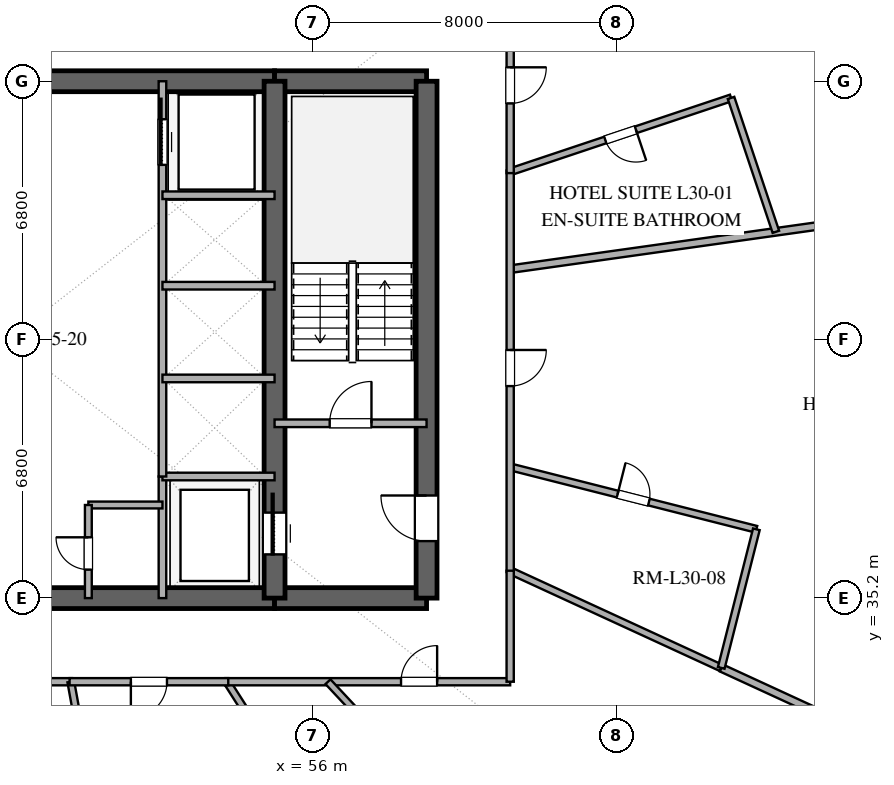
"""IFC4 building model, lengths in metres.
Left out: names, types, materials, properties, quantities, classifications, styles, units other than length and angle.
Written with IfcOpenShell. Run it as: python <this file> out.ifc"""

import sys

from ifc_helpers import new_model, si_unit, direction, frame, frame_2d, origin, place, context, subcontext, project, spatial, rectangle, extrude, element, fill, save


model = new_model("IFC4")
c1 = context("Model", 3, precision=1e-05, world=origin(), true_north=direction((0.0, 1.0)))
c2 = subcontext(c1, "Body", "Model", "MODEL_VIEW")
j1 = project(units=[si_unit("LENGTHUNIT", "METRE"), si_unit("PLANEANGLEUNIT", "RADIAN")], contexts=[c1])
p1 = place(None, origin())
s1 = spatial("IfcSite", under=j1, at=p1, CompositionType="ELEMENT")
p2 = place(p1, origin())
s2 = spatial("IfcBuilding", under=s1, at=p2, CompositionType="ELEMENT")
p3 = place(p2, frame((0.0, 0.0, 120.0)))
s3 = spatial("IfcBuildingStorey", under=s2, at=p3, CompositionType="ELEMENT", Elevation=120.0)
p4 = place(p3, frame((41.0, 35.2, 0.0), z_axis=(0.0, 0.0, 1.0), x_axis=(1.0, 0.0, 0.0)))
e1 = element("IfcWall", 1, at=p4, inside=s3, PredefinedType="SHEAR", context=c2, shape_type="SweptSolid", body=[
    extrude(rectangle(XDim=14.0, YDim=0.55, at=frame_2d((7.0, 0.0))), origin(), (0.0, 0.0, 1.0), 3.38),
])
p5 = place(p4, frame((6.1, 0.0, 0.0)))
e2 = element("IfcOpeningElement", 2, at=p5, cuts=e1, PredefinedType="OPENING", context=c2, shape_type="SweptSolid", body=[
    extrude(rectangle(XDim=1.8, YDim=2.25, at=frame_2d((0.9, 1.125))), frame((0.0, 0.285, 0.0), z_axis=(0.0, -1.0, 0.0), x_axis=(1.0, 0.0, 0.0)), (0.0, 0.0, 1.0), 0.57),
])
p6 = place(p3, frame((55.0, 35.2, 0.0), z_axis=(0.0, 0.0, 1.0), x_axis=(1.0, 0.0, 0.0)))
e3 = element("IfcWall", 3, at=p6, inside=s3, PredefinedType="SHEAR", context=c2, shape_type="SweptSolid", body=[
    extrude(rectangle(XDim=4.0, YDim=0.55, at=frame_2d((2.0, 0.0))), origin(), (0.0, 0.0, 1.0), 3.38),
])
p7 = place(p3, frame((41.0, 48.8, 0.0), z_axis=(0.0, 0.0, 1.0), x_axis=(1.0, 0.0, 0.0)))
e4 = element("IfcWall", 4, at=p7, inside=s3, PredefinedType="SHEAR", context=c2, shape_type="SweptSolid", body=[
    extrude(rectangle(XDim=14.0, YDim=0.55, at=frame_2d((7.0, 0.0))), origin(), (0.0, 0.0, 1.0), 3.38),
])
p8 = place(p7, frame((6.1, 0.0, 0.0)))
e5 = element("IfcOpeningElement", 5, at=p8, cuts=e4, PredefinedType="OPENING", context=c2, shape_type="SweptSolid", body=[
    extrude(rectangle(XDim=1.8, YDim=2.25, at=frame_2d((0.9, 1.125))), frame((0.0, 0.285, 0.0), z_axis=(0.0, -1.0, 0.0), x_axis=(1.0, 0.0, 0.0)), (0.0, 0.0, 1.0), 0.57),
])
p9 = place(p3, frame((55.0, 48.8, 0.0), z_axis=(0.0, 0.0, 1.0), x_axis=(1.0, 0.0, 0.0)))
e6 = element("IfcWall", 6, at=p9, inside=s3, PredefinedType="SHEAR", context=c2, shape_type="SweptSolid", body=[
    extrude(rectangle(XDim=4.0, YDim=0.55, at=frame_2d((2.0, 0.0))), origin(), (0.0, 0.0, 1.0), 3.38),
])
p10 = place(p3, frame((59.0, 35.2, 0.0), z_axis=(0.0, 0.0, 1.0), x_axis=(0.0, 1.0, 0.0)))
e7 = element("IfcWall", 7, at=p10, inside=s3, PredefinedType="SHEAR", context=c2, shape_type="SweptSolid", body=[
    extrude(rectangle(XDim=13.6, YDim=0.55, at=frame_2d((6.8, 0.0))), origin(), (0.0, 0.0, 1.0), 3.38),
])
p11 = place(p10, frame((1.5, 0.0, 0.0)))
e8 = element("IfcOpeningElement", 8, at=p11, cuts=e7, PredefinedType="OPENING", context=c2, shape_type="SweptSolid", body=[
    extrude(rectangle(XDim=1.2, YDim=2.15, at=frame_2d((0.6, 1.075))), frame((0.0, 0.285, 0.0), z_axis=(0.0, -1.0, 0.0), x_axis=(1.0, 0.0, 0.0)), (0.0, 0.0, 1.0), 0.57),
])
p12 = place(p3, frame((55.0, 35.2, 0.0), z_axis=(0.0, 0.0, 1.0), x_axis=(0.0, 1.0, 0.0)))
e9 = element("IfcWall", 9, at=p12, inside=s3, PredefinedType="SHEAR", context=c2, shape_type="SweptSolid", body=[
    extrude(rectangle(XDim=13.6, YDim=0.55, at=frame_2d((6.8, 0.0))), origin(), (0.0, 0.0, 1.0), 3.38),
])
p13 = place(p12, frame((1.15, 0.0, 0.0)))
e10 = element("IfcOpeningElement", 10, at=p13, cuts=e9, PredefinedType="OPENING", context=c2, shape_type="SweptSolid", body=[
    extrude(rectangle(XDim=1.1, YDim=2.2, at=frame_2d((0.55, 1.1))), frame((0.0, 0.285, 0.0), z_axis=(0.0, -1.0, 0.0), x_axis=(1.0, 0.0, 0.0)), (0.0, 0.0, 1.0), 0.57),
])
p14 = place(p3, frame((68.84, 26.14, 0.0), z_axis=(0.0, 0.0, 1.0), x_axis=(0.637505817448, 0.770445541696, 0.0)))
e11 = element("IfcWall", 11, at=p14, inside=s3, PredefinedType="SOLIDWALL", context=c2, shape_type="SweptSolid", body=[
    extrude(rectangle(XDim=9.445, YDim=0.28, at=frame_2d((4.723, 0.0))), origin(), (0.0, 0.0, 1.0), 3.38),
])
p15 = place(p14, frame((1.963, 0.0, 0.85)))
e12 = element("IfcOpeningElement", 12, at=p15, cuts=e11, PredefinedType="OPENING", context=c2, shape_type="SweptSolid", body=[
    extrude(rectangle(XDim=1.35, YDim=1.8, at=frame_2d((0.675, 0.9))), frame((0.0, 0.15, 0.0), z_axis=(0.0, -1.0, 0.0), x_axis=(1.0, 0.0, 0.0)), (0.0, 0.0, 1.0), 0.3),
])
p16 = place(p14, frame((3.815, 0.0, 0.85)))
e13 = element("IfcOpeningElement", 13, at=p16, cuts=e11, PredefinedType="OPENING", context=c2, shape_type="SweptSolid", body=[
    extrude(rectangle(XDim=1.35, YDim=1.8, at=frame_2d((0.675, 0.9))), frame((0.0, 0.15, 0.0), z_axis=(0.0, -1.0, 0.0), x_axis=(1.0, 0.0, 0.0)), (0.0, 0.0, 1.0), 0.3),
])
p17 = place(p14, frame((6.417, 0.0, 0.85)))
e14 = element("IfcOpeningElement", 14, at=p17, cuts=e11, PredefinedType="OPENING", context=c2, shape_type="SweptSolid", body=[
    extrude(rectangle(XDim=1.2, YDim=1.8, at=frame_2d((0.6, 0.9))), frame((0.0, 0.15, 0.0), z_axis=(0.0, -1.0, 0.0), x_axis=(1.0, 0.0, 0.0)), (0.0, 0.0, 1.0), 0.3),
])
p18 = place(p3, frame((55.0, 39.8, 0.0), z_axis=(0.0, 0.0, 1.0), x_axis=(1.0, 0.0, 0.0)))
e15 = element("IfcWall", 15, at=p18, inside=s3, PredefinedType="SOLIDWALL", context=c2, shape_type="SweptSolid", body=[
    extrude(rectangle(XDim=4.0, YDim=0.2, at=frame_2d((2.0, 0.0))), origin(), (0.0, 0.0, 1.0), 2.74),
])
p19 = place(p18, frame((1.45, 0.0, 0.0)))
e16 = element("IfcOpeningElement", 16, at=p19, cuts=e15, PredefinedType="OPENING", context=c2, shape_type="SweptSolid", body=[
    extrude(rectangle(XDim=1.1, YDim=2.15, at=frame_2d((0.55, 1.075))), frame((0.0, 0.11, 0.0), z_axis=(0.0, -1.0, 0.0), x_axis=(1.0, 0.0, 0.0)), (0.0, 0.0, 1.0), 0.22),
])
p20 = place(p3, frame((52.05, 35.2, 0.0), z_axis=(0.0, 0.0, 1.0), x_axis=(0.0, 1.0, 0.0)))
e17 = element("IfcWall", 17, at=p20, inside=s3, PredefinedType="SOLIDWALL", context=c2, shape_type="SweptSolid", body=[
    extrude(rectangle(XDim=3.2, YDim=0.2, at=frame_2d((1.6, 0.0))), origin(), (0.0, 0.0, 1.0), 2.74),
])
p21 = place(p3, frame((52.05, 38.4, 0.0), z_axis=(0.0, 0.0, 1.0), x_axis=(1.0, 0.0, 0.0)))
e18 = element("IfcWall", 18, at=p21, inside=s3, PredefinedType="SOLIDWALL", context=c2, shape_type="SweptSolid", body=[
    extrude(rectangle(XDim=2.95, YDim=0.2, at=frame_2d((1.475, 0.0))), origin(), (0.0, 0.0, 1.0), 2.74),
])
p22 = place(p3, frame((52.05, 38.4, 0.0), z_axis=(0.0, 0.0, 1.0), x_axis=(0.0, 1.0, 0.0)))
e19 = element("IfcWall", 19, at=p22, inside=s3, PredefinedType="SOLIDWALL", context=c2, shape_type="SweptSolid", body=[
    extrude(rectangle(XDim=10.4, YDim=0.2, at=frame_2d((5.2, 0.0))), origin(), (0.0, 0.0, 1.0), 2.74),
])
p23 = place(p22, frame((8.2, 0.0, 0.0)))
e20 = element("IfcOpeningElement", 20, at=p23, cuts=e19, PredefinedType="OPENING", context=c2, shape_type="SweptSolid", body=[
    extrude(rectangle(XDim=1.2, YDim=2.2, at=frame_2d((0.6, 1.1))), frame((0.0, 0.11, 0.0), z_axis=(0.0, -1.0, 0.0), x_axis=(1.0, 0.0, 0.0)), (0.0, 0.0, 1.0), 0.22),
])
for number, where, z_axis, x_axis in (
    (21, (52.05, 40.98, 0.0), (0.0, 0.0, 1.0), (1.0, 0.0, 0.0)),
    (22, (52.05, 43.42, 0.0), (0.0, 0.0, 1.0), (1.0, 0.0, 0.0)),
    (23, (52.05, 45.8, 0.0), (0.0, 0.0, 1.0), (1.0, 0.0, 0.0)),
):
    element("IfcWall", number, at=place(p3, frame(where, z_axis=z_axis, x_axis=x_axis)), inside=s3, PredefinedType="SOLIDWALL", context=c2, shape_type="SweptSolid", body=[
        extrude(rectangle(XDim=2.95, YDim=0.2, at=frame_2d((1.475, 0.0))), origin(), (0.0, 0.0, 1.0), 2.74),
    ])
p24 = place(p3, frame((50.1, 37.65, 0.0), z_axis=(0.0, 0.0, 1.0), x_axis=(1.0, 0.0, 0.0)))
e24 = element("IfcWall", 24, at=p24, inside=s3, PredefinedType="PLUMBINGWALL", context=c2, shape_type="SweptSolid", body=[
    extrude(rectangle(XDim=1.95, YDim=0.18, at=frame_2d((0.975, 0.0))), origin(), (0.0, 0.0, 1.0), 2.74),
])
p25 = place(p3, frame((50.1, 35.2, 0.0), z_axis=(0.0, 0.0, 1.0), x_axis=(0.0, 1.0, 0.0)))
e25 = element("IfcWall", 25, at=p25, inside=s3, PredefinedType="PLUMBINGWALL", context=c2, shape_type="SweptSolid", body=[
    extrude(rectangle(XDim=2.45, YDim=0.18, at=frame_2d((1.225, 0.0))), origin(), (0.0, 0.0, 1.0), 2.74),
])
p26 = place(p25, frame((0.75, 0.0, 0.0)))
e26 = element("IfcOpeningElement", 26, at=p26, cuts=e25, PredefinedType="OPENING", context=c2, shape_type="SweptSolid", body=[
    extrude(rectangle(XDim=0.85, YDim=2.1, at=frame_2d((0.425, 1.05))), frame((0.0, 0.1, 0.0), z_axis=(0.0, -1.0, 0.0), x_axis=(1.0, 0.0, 0.0)), (0.0, 0.0, 1.0), 0.2),
])
p27 = place(p3, frame((61.2, 43.855, 0.0), z_axis=(0.0, 0.0, 1.0), x_axis=(0.990266848234, 0.139181785048, 0.0)))
e27 = element("IfcWall", 27, at=p27, inside=s3, PredefinedType="PARTITIONING", context=c2, shape_type="SweptSolid", body=[
    extrude(rectangle(XDim=15.005, YDim=0.2, at=frame_2d((7.502, 0.0))), origin(), (0.0, 0.0, 1.0), 2.74),
])
p28 = place(p3, frame((49.671, 33.0, 0.0), z_axis=(0.0, 0.0, 1.0), x_axis=(-1.0, 0.0, 0.0)))
e28 = element("IfcWall", 28, at=p28, inside=s3, PredefinedType="PARTITIONING", context=c2, shape_type="SweptSolid", body=[
    extrude(rectangle(XDim=14.871, YDim=0.19, at=frame_2d((7.436, 0.0))), origin(), (0.0, 0.0, 1.0), 2.74),
])
p29 = place(p28, frame((10.576, 0.0, 0.0)))
e29 = element("IfcOpeningElement", 29, at=p29, cuts=e28, PredefinedType="OPENING", context=c2, shape_type="SweptSolid", body=[
    extrude(rectangle(XDim=0.95, YDim=2.15, at=frame_2d((0.475, 1.075))), frame((0.0, 0.105, 0.0), z_axis=(0.0, -1.0, 0.0), x_axis=(1.0, 0.0, 0.0)), (0.0, 0.0, 1.0), 0.21),
])
p30 = place(p28, frame((4.101, 0.0, 0.0)))
e30 = element("IfcOpeningElement", 30, at=p30, cuts=e28, PredefinedType="OPENING", context=c2, shape_type="SweptSolid", body=[
    extrude(rectangle(XDim=1.0, YDim=2.2, at=frame_2d((0.5, 1.1))), frame((0.0, 0.105, 0.0), z_axis=(0.0, -1.0, 0.0), x_axis=(1.0, 0.0, 0.0)), (0.0, 0.0, 1.0), 0.21),
])
p31 = place(p3, frame((61.2, 38.653, 0.0), z_axis=(0.0, 0.0, 1.0), x_axis=(0.96932048276, -0.24580032893, 0.0)))
e31 = element("IfcWall", 31, at=p31, inside=s3, PredefinedType="PLUMBINGWALL", context=c2, shape_type="SweptSolid", body=[
    extrude(rectangle(XDim=6.684, YDim=0.18, at=frame_2d((3.342, 0.0))), origin(), (0.0, 0.0, 1.0), 2.74),
])
p32 = place(p31, frame((2.917, 0.0, 0.0)))
e32 = element("IfcOpeningElement", 32, at=p32, cuts=e31, PredefinedType="OPENING", context=c2, shape_type="SweptSolid", body=[
    extrude(rectangle(XDim=0.85, YDim=2.1, at=frame_2d((0.425, 1.05))), frame((0.0, 0.1, 0.0), z_axis=(0.0, -1.0, 0.0), x_axis=(1.0, 0.0, 0.0)), (0.0, 0.0, 1.0), 0.2),
])
p33 = place(p3, frame((57.283, 27.454, 0.0), z_axis=(0.0, 0.0, 1.0), x_axis=(-0.537984400251, 0.842954794213, 0.0)))
e33 = element("IfcWall", 33, at=p33, inside=s3, PredefinedType="PLUMBINGWALL", context=c2, shape_type="SweptSolid", body=[
    extrude(rectangle(XDim=6.579, YDim=0.18, at=frame_2d((3.29, 0.0))), origin(), (0.0, 0.0, 1.0), 2.74),
])
p34 = place(p3, frame((72.701, 30.624, 0.0), z_axis=(0.0, 0.0, 1.0), x_axis=(-0.9083071886, 0.418303778536, 0.0)))
e34 = element("IfcWall", 34, at=p34, inside=s3, PredefinedType="PARTITIONING", context=c2, shape_type="SweptSolid", body=[
    extrude(rectangle(XDim=6.548, YDim=0.2, at=frame_2d((3.274, 0.0))), origin(), (0.0, 0.0, 1.0), 2.74),
])
p35 = place(p3, frame((67.012, 48.361, 0.0), z_axis=(0.0, 0.0, 1.0), x_axis=(-0.948332174456, -0.317279193915, 0.0)))
e35 = element("IfcWall", 35, at=p35, inside=s3, PredefinedType="PLUMBINGWALL", context=c2, shape_type="SweptSolid", body=[
    extrude(rectangle(XDim=6.129, YDim=0.18, at=frame_2d((3.064, 0.0))), origin(), (0.0, 0.0, 1.0), 2.74),
])
p36 = place(p35, frame((2.639, 0.0, 0.0)))
e36 = element("IfcOpeningElement", 36, at=p36, cuts=e35, PredefinedType="OPENING", context=c2, shape_type="SweptSolid", body=[
    extrude(rectangle(XDim=0.85, YDim=2.1, at=frame_2d((0.425, 1.05))), frame((0.0, 0.1, 0.0), z_axis=(0.0, -1.0, 0.0), x_axis=(1.0, 0.0, 0.0)), (0.0, 0.0, 1.0), 0.2),
])
p37 = place(p3, frame((66.754, 33.363, 0.0), z_axis=(0.0, 0.0, 1.0), x_axis=(-0.908301480607, 0.418316172681, 0.0)))
e37 = element("IfcWall", 37, at=p37, inside=s3, PredefinedType="PLUMBINGWALL", context=c2, shape_type="SweptSolid", body=[
    extrude(rectangle(XDim=6.115, YDim=0.18, at=frame_2d((3.057, 0.0))), origin(), (0.0, 0.0, 1.0), 2.74),
])
p38 = place(p3, frame((49.638, 33.0, 0.0), z_axis=(0.0, 0.0, 1.0), x_axis=(0.179135653645, -0.983824383512, 0.0)))
e38 = element("IfcWall", 38, at=p38, inside=s3, PredefinedType="PLUMBINGWALL", context=c2, shape_type="SweptSolid", body=[
    extrude(rectangle(XDim=5.839, YDim=0.18, at=frame_2d((2.919, 0.0))), origin(), (0.0, 0.0, 1.0), 2.74),
])
p39 = place(p38, frame((2.494, 0.0, 0.0)))
e39 = element("IfcOpeningElement", 39, at=p39, cuts=e38, PredefinedType="OPENING", context=c2, shape_type="SweptSolid", body=[
    extrude(rectangle(XDim=0.85, YDim=2.1, at=frame_2d((0.425, 1.05))), frame((0.0, 0.1, 0.0), z_axis=(0.0, -1.0, 0.0), x_axis=(1.0, 0.0, 0.0)), (0.0, 0.0, 1.0), 0.2),
])
p40 = place(p3, frame((61.2, 46.45, 0.0), z_axis=(0.0, 0.0, 1.0), x_axis=(0.0, -1.0, 0.0)))
e40 = element("IfcWall", 40, at=p40, inside=s3, PredefinedType="PARTITIONING", context=c2, shape_type="SweptSolid", body=[
    extrude(rectangle(XDim=10.564, YDim=0.19, at=frame_2d((5.282, 0.0))), origin(), (0.0, 0.0, 1.0), 2.74),
])
p41 = place(p40, frame((4.722, 0.0, 0.0)))
e41 = element("IfcOpeningElement", 41, at=p41, cuts=e40, PredefinedType="OPENING", context=c2, shape_type="SweptSolid", body=[
    extrude(rectangle(XDim=0.95, YDim=2.15, at=frame_2d((0.475, 1.075))), frame((0.0, 0.105, 0.0), z_axis=(0.0, -1.0, 0.0), x_axis=(1.0, 0.0, 0.0)), (0.0, 0.0, 1.0), 0.21),
])
p42 = place(p3, frame((53.706, 33.0, 0.0), z_axis=(0.0, 0.0, 1.0), x_axis=(1.0, 0.0, 0.0)))
e42 = element("IfcWall", 42, at=p42, inside=s3, PredefinedType="PARTITIONING", context=c2, shape_type="SweptSolid", body=[
    extrude(rectangle(XDim=7.494, YDim=0.19, at=frame_2d((3.747, 0.0))), origin(), (0.0, 0.0, 1.0), 2.74),
])
p43 = place(p42, frame((4.622, 0.0, 0.0)))
e43 = element("IfcOpeningElement", 43, at=p43, cuts=e42, PredefinedType="OPENING", context=c2, shape_type="SweptSolid", body=[
    extrude(rectangle(XDim=0.95, YDim=2.15, at=frame_2d((0.475, 1.075))), frame((0.0, 0.105, 0.0), z_axis=(0.0, -1.0, 0.0), x_axis=(1.0, 0.0, 0.0)), (0.0, 0.0, 1.0), 0.21),
])
p44 = place(p3, frame((56.406, 33.0, 0.0), z_axis=(0.0, 0.0, 1.0), x_axis=(0.682578142961, -0.730812615348, 0.0)))
e44 = element("IfcWall", 44, at=p44, inside=s3, PredefinedType="PLUMBINGWALL", context=c2, shape_type="SweptSolid", body=[
    extrude(rectangle(XDim=4.652, YDim=0.18, at=frame_2d((2.326, 0.0))), origin(), (0.0, 0.0, 1.0), 2.74),
])
p45 = place(p44, frame((1.901, 0.0, 0.0)))
e45 = element("IfcOpeningElement", 45, at=p45, cuts=e44, PredefinedType="OPENING", context=c2, shape_type="SweptSolid", body=[
    extrude(rectangle(XDim=0.85, YDim=2.1, at=frame_2d((0.425, 1.05))), frame((0.0, 0.1, 0.0), z_axis=(0.0, -1.0, 0.0), x_axis=(1.0, 0.0, 0.0)), (0.0, 0.0, 1.0), 0.2),
])
p46 = place(p3, frame((61.2, 51.0, 0.0), z_axis=(0.0, 0.0, 1.0), x_axis=(0.0, -1.0, 0.0)))
e46 = element("IfcWall", 46, at=p46, inside=s3, PredefinedType="PARTITIONING", context=c2, shape_type="SweptSolid", body=[
    extrude(rectangle(XDim=4.617, YDim=0.19, at=frame_2d((2.309, 0.0))), origin(), (0.0, 0.0, 1.0), 2.74),
])
p47 = place(p46, frame((1.833, 0.0, 0.0)))
e47 = element("IfcOpeningElement", 47, at=p47, cuts=e46, PredefinedType="OPENING", context=c2, shape_type="SweptSolid", body=[
    extrude(rectangle(XDim=0.95, YDim=2.15, at=frame_2d((0.475, 1.075))), frame((0.0, 0.105, 0.0), z_axis=(0.0, -1.0, 0.0), x_axis=(1.0, 0.0, 0.0)), (0.0, 0.0, 1.0), 0.21),
])
p48 = place(p3, frame((53.782, 33.0, 0.0), z_axis=(0.0, 0.0, 1.0), x_axis=(-1.0, 0.0, 0.0)))
e48 = element("IfcWall", 48, at=p48, inside=s3, PredefinedType="PARTITIONING", context=c2, shape_type="SweptSolid", body=[
    extrude(rectangle(XDim=4.176, YDim=0.19, at=frame_2d((2.088, 0.0))), origin(), (0.0, 0.0, 1.0), 2.74),
])
p49 = place(p48, frame((1.613, 0.0, 0.0)))
e49 = element("IfcOpeningElement", 49, at=p49, cuts=e48, PredefinedType="OPENING", context=c2, shape_type="SweptSolid", body=[
    extrude(rectangle(XDim=0.95, YDim=2.15, at=frame_2d((0.475, 1.075))), frame((0.0, 0.105, 0.0), z_axis=(0.0, -1.0, 0.0), x_axis=(1.0, 0.0, 0.0)), (0.0, 0.0, 1.0), 0.21),
])
p50 = place(p3, frame((67.678, 37.01, 0.0), z_axis=(0.0, 0.0, 1.0), x_axis=(-0.245725202551, -0.969339530212, 0.0)))
e50 = element("IfcWall", 50, at=p50, inside=s3, PredefinedType="PLUMBINGWALL", context=c2, shape_type="SweptSolid", body=[
    extrude(rectangle(XDim=3.763, YDim=0.18, at=frame_2d((1.881, 0.0))), origin(), (0.0, 0.0, 1.0), 2.74),
])
p51 = place(p3, frame((68.191, 44.838, 0.0), z_axis=(0.0, 0.0, 1.0), x_axis=(-0.317291996527, 0.948327891048, 0.0)))
e51 = element("IfcWall", 51, at=p51, inside=s3, PredefinedType="PLUMBINGWALL", context=c2, shape_type="SweptSolid", body=[
    extrude(rectangle(XDim=3.716, YDim=0.18, at=frame_2d((1.858, 0.0))), origin(), (0.0, 0.0, 1.0), 2.74),
])
p52 = place(p3, frame((61.2, 33.0, 0.0), z_axis=(0.0, 0.0, 1.0), x_axis=(0.0, 1.0, 0.0)))
e52 = element("IfcWall", 52, at=p52, inside=s3, PredefinedType="PARTITIONING", context=c2, shape_type="SweptSolid", body=[
    extrude(rectangle(XDim=2.921, YDim=0.19, at=frame_2d((1.46, 0.0))), origin(), (0.0, 0.0, 1.0), 2.74),
])
p53 = place(p13, origin())
e53 = element("IfcDoor", 53, at=p53, inside=s3, OperationType="SLIDING_TO_RIGHT", PredefinedType="DOOR", context=c2, shape_type="SweptSolid", body=[
    extrude(rectangle(XDim=1.1, YDim=2.2, at=frame_2d((0.55, 1.1))), frame((0.0, 0.025, 0.0), z_axis=(0.0, -1.0, 0.0), x_axis=(1.0, 0.0, 0.0)), (0.0, 0.0, 1.0), 0.05),
])
fill(e10, e53)
p54 = place(p11, origin())
e54 = element("IfcDoor", 54, at=p54, inside=s3, OperationType="SINGLE_SWING_RIGHT", PredefinedType="DOOR", context=c2, shape_type="SweptSolid", body=[
    extrude(rectangle(XDim=1.2, YDim=2.15, at=frame_2d((0.6, 1.075))), frame((0.0, 0.025, 0.0), z_axis=(0.0, -1.0, 0.0), x_axis=(1.0, 0.0, 0.0)), (0.0, 0.0, 1.0), 0.05),
])
fill(e8, e54)
p55 = place(p19, origin())
e55 = element("IfcDoor", 55, at=p55, inside=s3, OperationType="SINGLE_SWING_RIGHT", PredefinedType="DOOR", context=c2, shape_type="SweptSolid", body=[
    extrude(rectangle(XDim=1.1, YDim=2.15, at=frame_2d((0.55, 1.075))), frame((0.0, 0.025, 0.0), z_axis=(0.0, -1.0, 0.0), x_axis=(1.0, 0.0, 0.0)), (0.0, 0.0, 1.0), 0.05),
])
fill(e16, e55)
p56 = place(p23, origin())
e56 = element("IfcDoor", 56, at=p56, inside=s3, OperationType="SLIDING_TO_RIGHT", PredefinedType="DOOR", context=c2, shape_type="SweptSolid", body=[
    extrude(rectangle(XDim=1.2, YDim=2.2, at=frame_2d((0.6, 1.1))), frame((0.0, 0.025, 0.0), z_axis=(0.0, -1.0, 0.0), x_axis=(1.0, 0.0, 0.0)), (0.0, 0.0, 1.0), 0.05),
])
fill(e20, e56)
p57 = place(p26, origin())
e57 = element("IfcDoor", 57, at=p57, inside=s3, OperationType="SINGLE_SWING_RIGHT", PredefinedType="DOOR", context=c2, shape_type="SweptSolid", body=[
    extrude(rectangle(XDim=0.85, YDim=2.1, at=frame_2d((0.425, 1.05))), frame((0.0, 0.025, 0.0), z_axis=(0.0, -1.0, 0.0), x_axis=(1.0, 0.0, 0.0)), (0.0, 0.0, 1.0), 0.05),
])
fill(e26, e57)
p58 = place(p32, origin())
e58 = element("IfcDoor", 58, at=p58, inside=s3, OperationType="SINGLE_SWING_LEFT", PredefinedType="DOOR", context=c2, shape_type="SweptSolid", body=[
    extrude(rectangle(XDim=0.85, YDim=2.1, at=frame_2d((0.425, 1.05))), frame((0.0, 0.025, 0.0), z_axis=(0.0, -1.0, 0.0), x_axis=(1.0, 0.0, 0.0)), (0.0, 0.0, 1.0), 0.05),
])
fill(e32, e58)
p59 = place(p36, origin())
e59 = element("IfcDoor", 59, at=p59, inside=s3, OperationType="SINGLE_SWING_LEFT", PredefinedType="DOOR", context=c2, shape_type="SweptSolid", body=[
    extrude(rectangle(XDim=0.85, YDim=2.1, at=frame_2d((0.425, 1.05))), frame((0.0, 0.025, 0.0), z_axis=(0.0, -1.0, 0.0), x_axis=(1.0, 0.0, 0.0)), (0.0, 0.0, 1.0), 0.05),
])
fill(e36, e59)
p60 = place(p41, origin())
e60 = element("IfcDoor", 60, at=p60, inside=s3, OperationType="SINGLE_SWING_LEFT", PredefinedType="DOOR", context=c2, shape_type="SweptSolid", body=[
    extrude(rectangle(XDim=0.95, YDim=2.15, at=frame_2d((0.475, 1.075))), frame((0.0, 0.025, 0.0), z_axis=(0.0, -1.0, 0.0), x_axis=(1.0, 0.0, 0.0)), (0.0, 0.0, 1.0), 0.05),
])
fill(e41, e60)
p61 = place(p43, origin())
e61 = element("IfcDoor", 61, at=p61, inside=s3, OperationType="SINGLE_SWING_RIGHT", PredefinedType="DOOR", context=c2, shape_type="SweptSolid", body=[
    extrude(rectangle(XDim=0.95, YDim=2.15, at=frame_2d((0.475, 1.075))), frame((0.0, 0.025, 0.0), z_axis=(0.0, -1.0, 0.0), x_axis=(1.0, 0.0, 0.0)), (0.0, 0.0, 1.0), 0.05),
])
fill(e43, e61)
p62 = place(p47, origin())
e62 = element("IfcDoor", 62, at=p62, inside=s3, OperationType="SINGLE_SWING_LEFT", PredefinedType="DOOR", context=c2, shape_type="SweptSolid", body=[
    extrude(rectangle(XDim=0.95, YDim=2.15, at=frame_2d((0.475, 1.075))), frame((0.0, 0.025, 0.0), z_axis=(0.0, -1.0, 0.0), x_axis=(1.0, 0.0, 0.0)), (0.0, 0.0, 1.0), 0.05),
])
fill(e47, e62)
p63 = place(p49, origin())
e63 = element("IfcDoor", 63, at=p63, inside=s3, OperationType="SINGLE_SWING_RIGHT", PredefinedType="DOOR", context=c2, shape_type="SweptSolid", body=[
    extrude(rectangle(XDim=0.95, YDim=2.15, at=frame_2d((0.475, 1.075))), frame((0.0, 0.025, 0.0), z_axis=(0.0, -1.0, 0.0), x_axis=(1.0, 0.0, 0.0)), (0.0, 0.0, 1.0), 0.05),
])
fill(e49, e63)
save(model, sys.argv[1])
